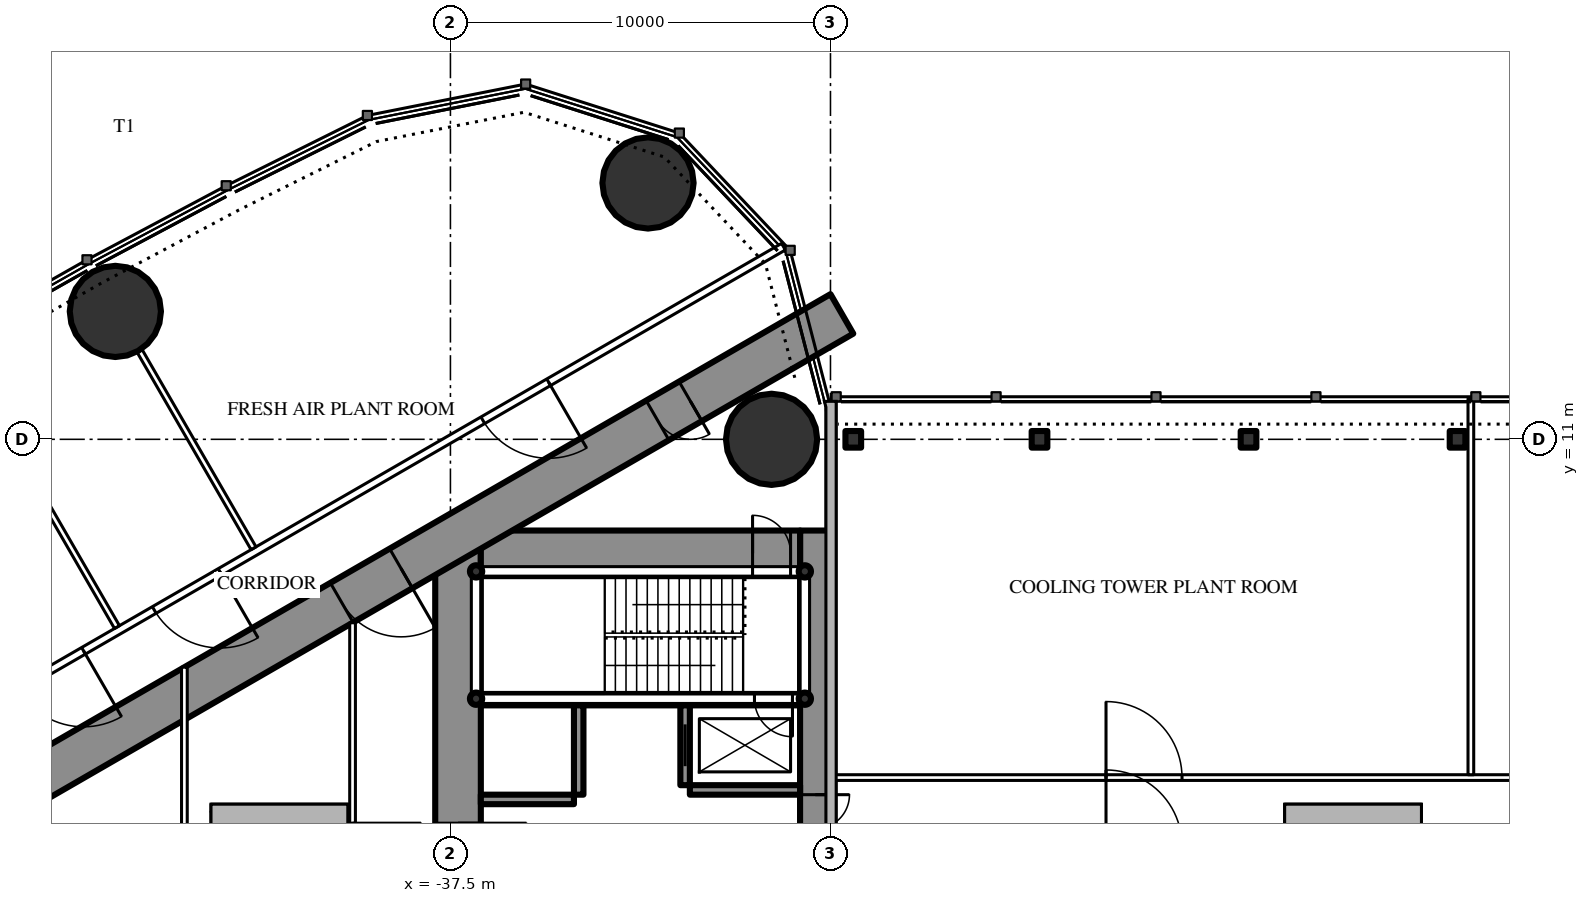
"""IFC4 building model, lengths in metres.
Left out: names, types, materials, properties, quantities, classifications, styles, units other than length and angle.
Written with IfcOpenShell. Run it as: python <this file> out.ifc"""

import sys

from ifc_helpers import new_model, si_unit, direction, frame, frame_2d, origin, origin_2d, place, context, subcontext, project, spatial, rectangle, circle, hollow_circle, i_section, extrude, element, fill, save


model = new_model("IFC4")
c1 = context("Model", 3, precision=1e-05, world=origin(), true_north=direction((0.0, 1.0)))
c2 = subcontext(c1, "Body", "Model", "MODEL_VIEW")
j1 = project(units=[si_unit("LENGTHUNIT", "METRE"), si_unit("PLANEANGLEUNIT", "RADIAN")], contexts=[c1])
p1 = place(None, origin())
s1 = spatial("IfcSite", under=j1, at=p1, CompositionType="ELEMENT")
p2 = place(p1, origin())
s2 = spatial("IfcBuilding", under=s1, at=p2, CompositionType="ELEMENT")
p3 = place(p2, frame((0.0, 0.0, 268.3)))
s3 = spatial("IfcBuildingStorey", under=s2, at=p3, CompositionType="ELEMENT", Elevation=268.3)
for number, where, z_axis, x_axis in (
    (1, (-32.301, 17.745, 0.0), (0.0, 0.0, 1.0), (1.0, 0.0, 0.0)),
    (2, (-29.05, 11.0, 0.0), (0.0, 0.0, 1.0), (1.0, 0.0, 0.0)),
    (3, (-46.317, 14.365, 0.0), (0.0, 0.0, 1.0), (1.0, 0.0, 0.0)),
):
    element("IfcColumn", number, at=place(p3, frame(where, z_axis=z_axis, x_axis=x_axis)), inside=s3, PredefinedType="COLUMN", context=c2, shape_type="SweptSolid", body=[
        extrude(circle(Radius=1.2, at=origin_2d()), origin(), (0.0, 0.0, 1.0), 5.0),
    ])
p4 = place(p3, frame((-27.9, 8.6, 0.0), z_axis=(0.0, 0.0, 1.0), x_axis=(0.0, -1.0, 0.0)))
e4 = element("IfcWall", 4, at=p4, inside=s3, PredefinedType="SHEAR", context=c2, shape_type="SweptSolid", body=[
    extrude(rectangle(XDim=17.2, YDim=0.8, at=frame_2d((8.6, 0.0))), origin(), (0.0, 0.0, 1.0), 5.0),
])
p5 = place(p4, frame((6.95, 0.0, 0.0)))
e5 = element("IfcOpeningElement", 5, at=p5, cuts=e4, PredefinedType="OPENING", context=c2, shape_type="SweptSolid", body=[
    extrude(rectangle(XDim=0.9, YDim=2.2, at=frame_2d((0.45, 1.1))), frame((0.0, 0.41, 0.0), z_axis=(0.0, -1.0, 0.0), x_axis=(1.0, 0.0, 0.0)), (0.0, 0.0, 1.0), 0.82),
])
p6 = place(p3, frame((-37.3, 8.6, 0.0), z_axis=(0.0, 0.0, 1.0), x_axis=(0.0, -1.0, 0.0)))
e6 = element("IfcWall", 6, at=p6, inside=s3, PredefinedType="SHEAR", context=c2, shape_type="SweptSolid", body=[
    extrude(rectangle(XDim=17.2, YDim=1.2, at=frame_2d((8.6, 0.0))), origin(), (0.0, 0.0, 1.0), 5.0),
])
p7 = place(p6, frame((7.7, 0.0, 0.0)))
e7 = element("IfcOpeningElement", 7, at=p7, cuts=e6, PredefinedType="OPENING", context=c2, shape_type="SweptSolid", body=[
    extrude(rectangle(XDim=1.8, YDim=2.2, at=frame_2d((0.9, 1.1))), frame((0.0, 0.61, 0.0), z_axis=(0.0, -1.0, 0.0), x_axis=(1.0, 0.0, 0.0)), (0.0, 0.0, 1.0), 1.22),
])
p8 = place(p3, frame((-28.3, 8.0, 0.0), z_axis=(0.0, 0.0, 1.0), x_axis=(-1.0, 0.0, 0.0)))
e8 = element("IfcWall", 8, at=p8, inside=s3, PredefinedType="SHEAR", context=c2, shape_type="SweptSolid", body=[
    extrude(rectangle(XDim=8.4, YDim=1.2, at=frame_2d((4.2, 0.0))), origin(), (0.0, 0.0, 1.0), 5.0),
])
p9 = place(p8, frame((0.25, 0.0, 0.0)))
e9 = element("IfcOpeningElement", 9, at=p9, cuts=e8, PredefinedType="OPENING", context=c2, shape_type="SweptSolid", body=[
    extrude(rectangle(XDim=1.0, YDim=2.2, at=frame_2d((0.5, 1.1))), frame((0.0, 0.61, 0.0), z_axis=(0.0, -1.0, 0.0), x_axis=(1.0, 0.0, 0.0)), (0.0, 0.0, 1.0), 1.22),
])
p10 = place(p3, frame((-28.3, 4.15, 0.0), z_axis=(0.0, 0.0, 1.0), x_axis=(-1.0, 0.0, 0.0)))
e10 = element("IfcWall", 10, at=p10, inside=s3, PredefinedType="SHEAR", context=c2, shape_type="SweptSolid", body=[
    extrude(rectangle(XDim=8.4, YDim=0.3, at=frame_2d((4.2, 0.0))), origin(), (0.0, 0.0, 1.0), 5.0),
])
p11 = place(p3, frame((-31.325, 4.0, 0.0), z_axis=(0.0, 0.0, 1.0), x_axis=(0.0, -1.0, 0.0)))
e11 = element("IfcWall", 11, at=p11, inside=s3, PredefinedType="SHEAR", context=c2, shape_type="SweptSolid", body=[
    extrude(rectangle(XDim=2.1, YDim=0.25, at=frame_2d((1.05, 0.0))), origin(), (0.0, 0.0, 1.0), 5.0),
])
p12 = place(p11, frame((0.5, 0.0, 0.0)))
e12 = element("IfcOpeningElement", 12, at=p12, cuts=e11, PredefinedType="OPENING", context=c2, shape_type="SweptSolid", body=[
    extrude(rectangle(XDim=1.1, YDim=2.2, at=frame_2d((0.55, 1.1))), frame((0.0, 0.135, 0.0), z_axis=(0.0, -1.0, 0.0), x_axis=(1.0, 0.0, 0.0)), (0.0, 0.0, 1.0), 0.27),
])
p13 = place(p3, frame((-34.125, 4.0, 0.0), z_axis=(0.0, 0.0, 1.0), x_axis=(0.0, -1.0, 0.0)))
e13 = element("IfcWall", 13, at=p13, inside=s3, PredefinedType="SHEAR", context=c2, shape_type="SweptSolid", body=[
    extrude(rectangle(XDim=2.35, YDim=0.25, at=frame_2d((1.175, 0.0))), origin(), (0.0, 0.0, 1.0), 5.0),
])
p14 = place(p3, frame((-28.3, 1.775, 0.0), z_axis=(0.0, 0.0, 1.0), x_axis=(-1.0, 0.0, 0.0)))
e14 = element("IfcWall", 14, at=p14, inside=s3, PredefinedType="SHEAR", context=c2, shape_type="SweptSolid", body=[
    extrude(rectangle(XDim=2.9, YDim=0.25, at=frame_2d((1.45, 0.0))), origin(), (0.0, 0.0, 1.0), 5.0),
])
p15 = place(p3, frame((-34.25, 1.525, 0.0), z_axis=(0.0, 0.0, 1.0), x_axis=(-1.0, 0.0, 0.0)))
e15 = element("IfcWall", 15, at=p15, inside=s3, PredefinedType="SHEAR", context=c2, shape_type="SweptSolid", body=[
    extrude(rectangle(XDim=2.45, YDim=0.25, at=frame_2d((1.225, 0.0))), origin(), (0.0, 0.0, 1.0), 5.0),
])
p16 = place(p3, frame((-27.2, 14.3, 0.0), z_axis=(0.0, 0.0, 1.0), x_axis=(-0.866026593062, -0.499997940104, 0.0)))
e16 = element("IfcWall", 16, at=p16, inside=s3, PredefinedType="SHEAR", context=c2, shape_type="SweptSolid", body=[
    extrude(rectangle(XDim=28.946, YDim=1.2, at=frame_2d((14.473, 0.0))), origin(), (0.0, 0.0, 1.0), 5.0),
])
p17 = place(p16, frame((4.6, 0.0, 0.0)))
e17 = element("IfcOpeningElement", 17, at=p17, cuts=e16, PredefinedType="OPENING", context=c2, shape_type="SweptSolid", body=[
    extrude(rectangle(XDim=1.0, YDim=2.2, at=frame_2d((0.5, 1.1))), frame((0.0, 0.61, 0.0), z_axis=(0.0, -1.0, 0.0), x_axis=(1.0, 0.0, 0.0)), (0.0, 0.0, 1.0), 1.22),
])
p18 = place(p16, frame((13.395, 0.0, 0.0)))
e18 = element("IfcOpeningElement", 18, at=p18, cuts=e16, PredefinedType="OPENING", context=c2, shape_type="SweptSolid", body=[
    extrude(rectangle(XDim=1.8, YDim=2.2, at=frame_2d((0.9, 1.1))), frame((0.0, 0.61, 0.0), z_axis=(0.0, -1.0, 0.0), x_axis=(1.0, 0.0, 0.0)), (0.0, 0.0, 1.0), 1.22),
])
for number, where, z_axis, x_axis in (
    (19, (-26.9, 11.0, 0.0), (0.0, 0.0, 1.0), (1.0, 0.0, 0.0)),
    (20, (-22.0, 11.0, 0.0), (0.0, 0.0, 1.0), (1.0, 0.0, 0.0)),
    (21, (-16.5, 11.0, 0.0), (0.0, 0.0, 1.0), (1.0, 0.0, 0.0)),
    (22, (-11.0, 11.0, 0.0), (0.0, 0.0, 1.0), (1.0, 0.0, 0.0)),
):
    element("IfcColumn", number, at=place(p3, frame(where, z_axis=z_axis, x_axis=x_axis)), inside=s3, PredefinedType="COLUMN", context=c2, shape_type="SweptSolid", body=[
        extrude(i_section(OverallWidth=0.412, OverallDepth=0.437, WebThickness=0.036, FlangeThickness=0.058, FilletRadius=0.015, at=origin_2d()), origin(), (0.0, 0.0, 1.0), 5.0),
    ])
for number, where, z_axis, x_axis in (
    (23, (-28.175, 7.525, 5.0), (0.0, 0.0, 1.0), (1.0, 0.0, 0.0)),
    (24, (-36.825, 7.525, 5.0), (0.0, 0.0, 1.0), (1.0, 0.0, 0.0)),
    (25, (-28.175, 4.175, 5.0), (0.0, 0.0, 1.0), (1.0, 0.0, 0.0)),
    (26, (-36.825, 4.175, 5.0), (0.0, 0.0, 1.0), (1.0, 0.0, 0.0)),
):
    element("IfcColumn", number, at=place(p3, frame(where, z_axis=z_axis, x_axis=x_axis)), inside=s3, PredefinedType="COLUMN", context=c2, shape_type="SweptSolid", body=[
        extrude(hollow_circle(Radius=0.162, WallThickness=0.012, at=origin_2d()), origin(), (0.0, 0.0, 1.0), 3.0),
    ])
for number, where, z_axis, x_axis in (
    (27, (-28.175, 7.422, 5.0), (0.0, 0.0, 1.0), (0.0, -1.0, 0.0)),
    (28, (-36.825, 7.422, 5.0), (0.0, 0.0, 1.0), (0.0, -1.0, 0.0)),
):
    element("IfcWall", number, at=place(p3, frame(where, z_axis=z_axis, x_axis=x_axis)), inside=s3, PredefinedType="SOLIDWALL", context=c2, shape_type="SweptSolid", body=[
        extrude(rectangle(XDim=3.144, YDim=0.25, at=frame_2d((1.572, 0.0))), origin(), (0.0, 0.0, 1.0), 2.54),
    ])
p19 = place(p3, frame((-28.278, 7.525, 5.0), z_axis=(0.0, 0.0, 1.0), x_axis=(-1.0, 0.0, 0.0)))
e29 = element("IfcWall", 29, at=p19, inside=s3, PredefinedType="SOLIDWALL", context=c2, shape_type="SweptSolid", body=[
    extrude(rectangle(XDim=8.444, YDim=0.25, at=frame_2d((4.222, 0.0))), origin(), (0.0, 0.0, 1.0), 2.54),
])
p20 = place(p3, frame((-28.278, 4.175, 5.0), z_axis=(0.0, 0.0, 1.0), x_axis=(-1.0, 0.0, 0.0)))
e30 = element("IfcWall", 30, at=p20, inside=s3, PredefinedType="SOLIDWALL", context=c2, shape_type="SweptSolid", body=[
    extrude(rectangle(XDim=8.444, YDim=0.25, at=frame_2d((4.222, 0.0))), origin(), (0.0, 0.0, 1.0), 2.54),
])
p21 = place(p20, frame((0.222, 0.0, 0.0)))
e31 = element("IfcOpeningElement", 31, at=p21, cuts=e30, PredefinedType="OPENING", context=c2, shape_type="SweptSolid", body=[
    extrude(rectangle(XDim=1.0, YDim=2.2, at=frame_2d((0.5, 1.1))), frame((0.0, 0.135, 0.0), z_axis=(0.0, -1.0, 0.0), x_axis=(1.0, 0.0, 0.0)), (0.0, 0.0, 1.0), 0.27),
])
p22 = place(p3, frame((-40.2, 1.3, 5.0), z_axis=(0.0, 0.0, 1.0), x_axis=(-1.0, 0.0, 0.0)))
e32 = element("IfcWall", 32, at=p22, inside=s3, PredefinedType="SOLIDWALL", context=c2, shape_type="SweptSolid", body=[
    extrude(rectangle(XDim=3.6, YDim=0.2, at=frame_2d((1.8, 0.0))), origin(), (0.0, 0.0, 1.0), 2.6),
])
p23 = place(p3, frame((-43.7, 1.2, 5.0), z_axis=(0.0, 0.0, 1.0), x_axis=(0.0, -1.0, 0.0)))
e33 = element("IfcWall", 33, at=p23, inside=s3, PredefinedType="SOLIDWALL", context=c2, shape_type="SweptSolid", body=[
    extrude(rectangle(XDim=2.4, YDim=0.2, at=frame_2d((1.2, 0.0))), origin(), (0.0, 0.0, 1.0), 2.6),
])
p24 = place(p3, frame((-40.3, -1.2, 5.0), z_axis=(0.0, 0.0, 1.0), x_axis=(0.0, 1.0, 0.0)))
e34 = element("IfcWall", 34, at=p24, inside=s3, PredefinedType="SOLIDWALL", context=c2, shape_type="SweptSolid", body=[
    extrude(rectangle(XDim=2.4, YDim=0.2, at=frame_2d((1.2, 0.0))), origin(), (0.0, 0.0, 1.0), 2.6),
])
p25 = place(p24, frame((0.7, 0.0, 0.0)))
e35 = element("IfcOpeningElement", 35, at=p25, cuts=e34, PredefinedType="OPENING", context=c2, shape_type="SweptSolid", body=[
    extrude(rectangle(XDim=1.0, YDim=2.2, at=frame_2d((0.5, 1.1))), frame((0.0, 0.11, 0.0), z_axis=(0.0, -1.0, 0.0), x_axis=(1.0, 0.0, 0.0)), (0.0, 0.0, 1.0), 0.22),
])
p26 = place(p3, frame((-11.95, 1.3, 5.0), z_axis=(0.0, 0.0, 1.0), x_axis=(-1.0, 0.0, 0.0)))
e36 = element("IfcWall", 36, at=p26, inside=s3, PredefinedType="SOLIDWALL", context=c2, shape_type="SweptSolid", body=[
    extrude(rectangle(XDim=3.6, YDim=0.2, at=frame_2d((1.8, 0.0))), origin(), (0.0, 0.0, 1.0), 2.6),
])
for number, where, z_axis, x_axis in (
    (37, (-15.45, 1.2, 5.0), (0.0, 0.0, 1.0), (0.0, -1.0, 0.0)),
    (38, (-12.05, -1.2, 5.0), (0.0, 0.0, 1.0), (0.0, 1.0, 0.0)),
):
    element("IfcWall", number, at=place(p3, frame(where, z_axis=z_axis, x_axis=x_axis)), inside=s3, PredefinedType="SOLIDWALL", context=c2, shape_type="SweptSolid", body=[
        extrude(rectangle(XDim=2.4, YDim=0.2, at=frame_2d((1.2, 0.0))), origin(), (0.0, 0.0, 1.0), 2.6),
    ])
p27 = place(p3, frame((-28.737, 16.068, 0.0), z_axis=(0.0, 0.0, 1.0), x_axis=(-0.866026057212, -0.499998868229, 0.0)))
e39 = element("IfcWall", 39, at=p27, inside=s3, PredefinedType="PARTITIONING", context=c2, shape_type="SweptSolid", body=[
    extrude(rectangle(XDim=32.137, YDim=0.2, at=frame_2d((16.068, 0.0))), origin(), (0.0, 0.0, 1.0), 4.7),
])
p28 = place(p27, frame((7.134, 0.0, 0.0)))
e40 = element("IfcOpeningElement", 40, at=p28, cuts=e39, PredefinedType="OPENING", context=c2, shape_type="SweptSolid", body=[
    extrude(rectangle(XDim=2.0, YDim=2.4, at=frame_2d((1.0, 1.2))), frame((0.0, 0.11, 0.0), z_axis=(0.0, -1.0, 0.0), x_axis=(1.0, 0.0, 0.0)), (0.0, 0.0, 1.0), 0.22),
])
p29 = place(p27, frame((17.117, 0.0, 0.0)))
e41 = element("IfcOpeningElement", 41, at=p29, cuts=e39, PredefinedType="OPENING", context=c2, shape_type="SweptSolid", body=[
    extrude(rectangle(XDim=2.0, YDim=2.4, at=frame_2d((1.0, 1.2))), frame((0.0, 0.11, 0.0), z_axis=(0.0, -1.0, 0.0), x_axis=(1.0, 0.0, 0.0)), (0.0, 0.0, 1.0), 0.22),
])
p30 = place(p27, frame((21.266, 0.0, 0.0)))
e42 = element("IfcOpeningElement", 42, at=p30, cuts=e39, PredefinedType="OPENING", context=c2, shape_type="SweptSolid", body=[
    extrude(rectangle(XDim=2.0, YDim=2.4, at=frame_2d((1.0, 1.2))), frame((0.0, 0.11, 0.0), z_axis=(0.0, -1.0, 0.0), x_axis=(1.0, 0.0, 0.0)), (0.0, 0.0, 1.0), 0.22),
])
p31 = place(p27, frame((27.126, 0.0, 0.0)))
e43 = element("IfcOpeningElement", 43, at=p31, cuts=e39, PredefinedType="OPENING", context=c2, shape_type="SweptSolid", body=[
    extrude(rectangle(XDim=2.0, YDim=2.4, at=frame_2d((1.0, 1.2))), frame((0.0, 0.11, 0.0), z_axis=(0.0, -1.0, 0.0), x_axis=(1.0, 0.0, 0.0)), (0.0, 0.0, 1.0), 0.22),
])
p32 = place(p3, frame((-42.68, 8.134, 0.0), z_axis=(0.0, 0.0, 1.0), x_axis=(-0.499984479505, 0.866034364361, 0.0)))
e44 = element("IfcWall", 44, at=p32, inside=s3, PredefinedType="PARTITIONING", context=c2, shape_type="SweptSolid", body=[
    extrude(rectangle(XDim=5.995, YDim=0.15, at=frame_2d((2.998, 0.0))), origin(), (0.0, 0.0, 1.0), 3.8),
])
p33 = place(p3, frame((-46.274, 6.059, 0.0), z_axis=(0.0, 0.0, 1.0), x_axis=(-0.500020471368, 0.866013584312, 0.0)))
e45 = element("IfcWall", 45, at=p33, inside=s3, PredefinedType="PARTITIONING", context=c2, shape_type="SweptSolid", body=[
    extrude(rectangle(XDim=6.028, YDim=0.15, at=frame_2d((3.014, 0.0))), origin(), (0.0, 0.0, 1.0), 3.8),
])
p34 = place(p3, frame((-40.075, 6.174, 0.0), z_axis=(0.0, 0.0, 1.0), x_axis=(0.0, -1.0, 0.0)))
e46 = element("IfcWall", 46, at=p34, inside=s3, PredefinedType="PARTITIONING", context=c2, shape_type="SweptSolid", body=[
    extrude(rectangle(XDim=12.348, YDim=0.15, at=frame_2d((6.174, 0.0))), origin(), (0.0, 0.0, 1.0), 4.7),
])
p35 = place(p34, frame((5.274, 0.0, 0.0)))
e47 = element("IfcOpeningElement", 47, at=p35, cuts=e46, PredefinedType="OPENING", context=c2, shape_type="SweptSolid", body=[
    extrude(rectangle(XDim=1.8, YDim=2.2, at=frame_2d((0.9, 1.1))), frame((0.0, 0.085, 0.0), z_axis=(0.0, -1.0, 0.0), x_axis=(1.0, 0.0, 0.0)), (0.0, 0.0, 1.0), 0.17),
])
p36 = place(p3, frame((-44.5, 5.005, 0.0), z_axis=(0.0, 0.0, 1.0), x_axis=(0.0, -1.0, 0.0)))
e48 = element("IfcWall", 48, at=p36, inside=s3, PredefinedType="PARTITIONING", context=c2, shape_type="SweptSolid", body=[
    extrude(rectangle(XDim=10.009, YDim=0.15, at=frame_2d((5.005, 0.0))), origin(), (0.0, 0.0, 1.0), 3.85),
])
p37 = place(p36, frame((4.505, 0.0, 0.0)))
e49 = element("IfcOpeningElement", 49, at=p37, cuts=e48, PredefinedType="OPENING", context=c2, shape_type="SweptSolid", body=[
    extrude(rectangle(XDim=1.0, YDim=2.2, at=frame_2d((0.5, 1.1))), frame((0.0, 0.085, 0.0), z_axis=(0.0, -1.0, 0.0), x_axis=(1.0, 0.0, 0.0)), (0.0, 0.0, 1.0), 0.17),
])
p38 = place(p3, frame((-27.5, 2.1, 0.0), z_axis=(0.0, 0.0, 1.0), x_axis=(1.0, 0.0, 0.0)))
e50 = element("IfcWall", 50, at=p38, inside=s3, PredefinedType="PARTITIONING", context=c2, shape_type="SweptSolid", body=[
    extrude(rectangle(XDim=55.0, YDim=0.15, at=frame_2d((27.5, 0.0))), origin(), (0.0, 0.0, 1.0), 4.7),
])
p39 = place(p38, frame((7.25, 0.0, 0.0)))
e51 = element("IfcOpeningElement", 51, at=p39, cuts=e50, PredefinedType="OPENING", context=c2, shape_type="SweptSolid", body=[
    extrude(rectangle(XDim=2.0, YDim=2.4, at=frame_2d((1.0, 1.2))), frame((0.0, 0.085, 0.0), z_axis=(0.0, -1.0, 0.0), x_axis=(1.0, 0.0, 0.0)), (0.0, 0.0, 1.0), 0.17),
])
p40 = place(p38, frame((29.25, 0.0, 0.0)))
e52 = element("IfcOpeningElement", 52, at=p40, cuts=e50, PredefinedType="OPENING", context=c2, shape_type="SweptSolid", body=[
    extrude(rectangle(XDim=2.0, YDim=2.4, at=frame_2d((1.0, 1.2))), frame((0.0, 0.085, 0.0), z_axis=(0.0, -1.0, 0.0), x_axis=(1.0, 0.0, 0.0)), (0.0, 0.0, 1.0), 0.17),
])
p41 = place(p38, frame((45.75, 0.0, 0.0)))
e53 = element("IfcOpeningElement", 53, at=p41, cuts=e50, PredefinedType="OPENING", context=c2, shape_type="SweptSolid", body=[
    extrude(rectangle(XDim=2.0, YDim=2.4, at=frame_2d((1.0, 1.2))), frame((0.0, 0.085, 0.0), z_axis=(0.0, -1.0, 0.0), x_axis=(1.0, 0.0, 0.0)), (0.0, 0.0, 1.0), 0.17),
])
p42 = place(p3, frame((-10.65, 2.175, 0.0), z_axis=(0.0, 0.0, 1.0), x_axis=(0.0, 1.0, 0.0)))
e54 = element("IfcWall", 54, at=p42, inside=s3, PredefinedType="PARTITIONING", context=c2, shape_type="SweptSolid", body=[
    extrude(rectangle(XDim=9.895, YDim=0.15, at=frame_2d((4.948, 0.0))), origin(), (0.0, 0.0, 1.0), 4.7),
])
p43 = place(p21, origin())
e55 = element("IfcDoor", 55, at=p43, inside=s3, OperationType="SINGLE_SWING_LEFT", PredefinedType="DOOR", context=c2, shape_type="SweptSolid", body=[
    extrude(rectangle(XDim=1.0, YDim=2.2, at=frame_2d((0.5, 1.1))), frame((0.0, 0.025, 0.0), z_axis=(0.0, -1.0, 0.0), x_axis=(1.0, 0.0, 0.0)), (0.0, 0.0, 1.0), 0.05),
])
fill(e31, e55)
p44 = place(p28, origin())
e56 = element("IfcDoor", 56, at=p44, inside=s3, OperationType="DOUBLE_DOOR_SINGLE_SWING", PredefinedType="DOOR", context=c2, shape_type="SweptSolid", body=[
    extrude(rectangle(XDim=2.0, YDim=2.4, at=frame_2d((1.0, 1.2))), frame((0.0, 0.025, 0.0), z_axis=(0.0, -1.0, 0.0), x_axis=(1.0, 0.0, 0.0)), (0.0, 0.0, 1.0), 0.05),
])
fill(e40, e56)
p45 = place(p29, origin())
e57 = element("IfcDoor", 57, at=p45, inside=s3, OperationType="DOUBLE_DOOR_SINGLE_SWING", PredefinedType="DOOR", context=c2, shape_type="SweptSolid", body=[
    extrude(rectangle(XDim=2.0, YDim=2.4, at=frame_2d((1.0, 1.2))), frame((0.0, 0.025, 0.0), z_axis=(0.0, -1.0, 0.0), x_axis=(1.0, 0.0, 0.0)), (0.0, 0.0, 1.0), 0.05),
])
fill(e41, e57)
p46 = place(p30, origin())
e58 = element("IfcDoor", 58, at=p46, inside=s3, OperationType="DOUBLE_DOOR_SINGLE_SWING", PredefinedType="DOOR", context=c2, shape_type="SweptSolid", body=[
    extrude(rectangle(XDim=2.0, YDim=2.4, at=frame_2d((1.0, 1.2))), frame((0.0, 0.025, 0.0), z_axis=(0.0, -1.0, 0.0), x_axis=(1.0, 0.0, 0.0)), (0.0, 0.0, 1.0), 0.05),
])
fill(e42, e58)
p47 = place(p35, origin())
e59 = element("IfcDoor", 59, at=p47, inside=s3, OperationType="DOUBLE_DOOR_SINGLE_SWING", PredefinedType="DOOR", context=c2, shape_type="SweptSolid", body=[
    extrude(rectangle(XDim=1.8, YDim=2.2, at=frame_2d((0.9, 1.1))), frame((0.0, 0.025, 0.0), z_axis=(0.0, -1.0, 0.0), x_axis=(1.0, 0.0, 0.0)), (0.0, 0.0, 1.0), 0.05),
])
fill(e47, e59)
p48 = place(p17, origin())
e60 = element("IfcDoor", 60, at=p48, inside=s3, OperationType="SINGLE_SWING_LEFT", PredefinedType="DOOR", context=c2, shape_type="SweptSolid", body=[
    extrude(rectangle(XDim=1.0, YDim=2.2, at=frame_2d((0.5, 1.1))), frame((0.0, 0.025, 0.0), z_axis=(0.0, -1.0, 0.0), x_axis=(1.0, 0.0, 0.0)), (0.0, 0.0, 1.0), 0.05),
])
fill(e17, e60)
p49 = place(p18, origin())
e61 = element("IfcDoor", 61, at=p49, inside=s3, OperationType="DOUBLE_DOOR_SINGLE_SWING", PredefinedType="DOOR", context=c2, shape_type="SweptSolid", body=[
    extrude(rectangle(XDim=1.8, YDim=2.2, at=frame_2d((0.9, 1.1))), frame((0.0, 0.025, 0.0), z_axis=(0.0, -1.0, 0.0), x_axis=(1.0, 0.0, 0.0)), (0.0, 0.0, 1.0), 0.05),
])
fill(e18, e61)
p50 = place(p7, origin())
e62 = element("IfcDoor", 62, at=p50, inside=s3, OperationType="DOUBLE_DOOR_SINGLE_SWING", PredefinedType="DOOR", context=c2, shape_type="SweptSolid", body=[
    extrude(rectangle(XDim=1.8, YDim=2.2, at=frame_2d((0.9, 1.1))), frame((0.0, 0.025, 0.0), z_axis=(0.0, -1.0, 0.0), x_axis=(1.0, 0.0, 0.0)), (0.0, 0.0, 1.0), 0.05),
])
fill(e7, e62)
p51 = place(p9, origin())
e63 = element("IfcDoor", 63, at=p51, inside=s3, OperationType="SINGLE_SWING_RIGHT", PredefinedType="DOOR", context=c2, shape_type="SweptSolid", body=[
    extrude(rectangle(XDim=1.0, YDim=2.2, at=frame_2d((0.5, 1.1))), frame((0.0, 0.025, 0.0), z_axis=(0.0, -1.0, 0.0), x_axis=(1.0, 0.0, 0.0)), (0.0, 0.0, 1.0), 0.05),
])
fill(e9, e63)
p52 = place(p5, origin())
e64 = element("IfcDoor", 64, at=p52, inside=s3, OperationType="SINGLE_SWING_LEFT", PredefinedType="DOOR", context=c2, shape_type="SweptSolid", body=[
    extrude(rectangle(XDim=0.9, YDim=2.2, at=frame_2d((0.45, 1.1))), frame((0.0, 0.025, 0.0), z_axis=(0.0, -1.0, 0.0), x_axis=(1.0, 0.0, 0.0)), (0.0, 0.0, 1.0), 0.05),
])
fill(e5, e64)
p53 = place(p39, origin())
e65 = element("IfcDoor", 65, at=p53, inside=s3, OperationType="DOUBLE_DOOR_SINGLE_SWING", PredefinedType="DOOR", context=c2, shape_type="SweptSolid", body=[
    extrude(rectangle(XDim=2.0, YDim=2.4, at=frame_2d((1.0, 1.2))), frame((0.0, 0.025, 0.0), z_axis=(0.0, -1.0, 0.0), x_axis=(1.0, 0.0, 0.0)), (0.0, 0.0, 1.0), 0.05),
])
fill(e51, e65)
p54 = place(p12, origin())
e66 = element("IfcDoor", 66, at=p54, inside=s3, OperationType="SLIDING_TO_LEFT", PredefinedType="USERDEFINED", context=c2, shape_type="SweptSolid", body=[
    extrude(rectangle(XDim=1.1, YDim=2.2, at=frame_2d((0.55, 1.1))), frame((0.0, 0.025, 0.0), z_axis=(0.0, -1.0, 0.0), x_axis=(1.0, 0.0, 0.0)), (0.0, 0.0, 1.0), 0.05),
])
fill(e12, e66)
save(model, sys.argv[1])
